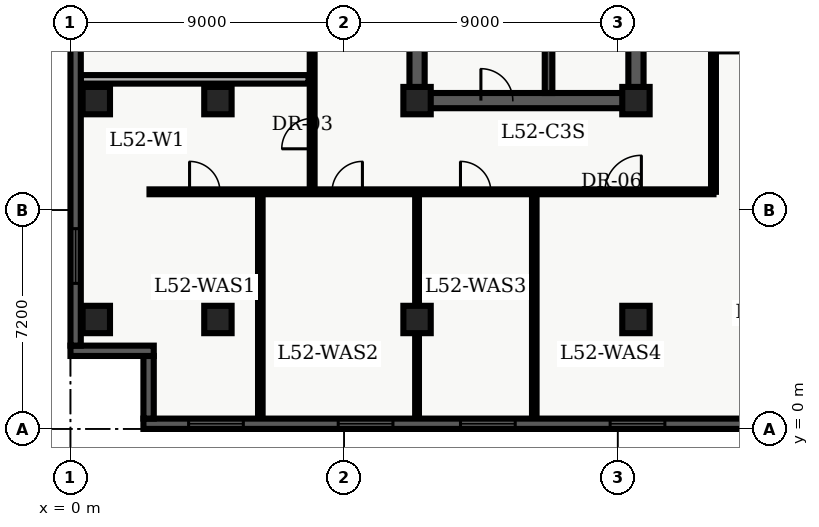
"""IFC4 building model, lengths in metres.
Left out: names, types, materials, properties, quantities, classifications, styles, units other than length and angle.
Written with IfcOpenShell. Run it as: python <this file> out.ifc"""

import sys

from ifc_helpers import new_model, entity, si_unit, converted_unit, direction, frame, origin_with_axes, origin_2d_with_axis, place, context, subcontext, project, spatial, polyline, rectangle, outline, extrude, element, fill, save


model = new_model("IFC4")
c1 = context("Model", 3, precision=1e-05, world=origin_with_axes(), true_north=direction((0.0, 1.0)))
c2 = subcontext(c1, "Body", "Model", "MODEL_VIEW")
j1 = project(units=[si_unit("LENGTHUNIT", "METRE"), converted_unit("PLANEANGLEUNIT", "DEGREE", entity("IfcPlaneAngleMeasure", 0.017), si_unit("PLANEANGLEUNIT", "RADIAN"), dimensions=[0, 0, 0, 0, 0, 0, 0])], contexts=[c1])
p1 = place(None, origin_with_axes())
s1 = spatial("IfcSite", under=j1, at=p1, CompositionType="ELEMENT")
p2 = place(p1, origin_with_axes())
s2 = spatial("IfcBuilding", under=s1, at=p2, CompositionType="ELEMENT")
p3 = place(p2, frame((0.0, 0.0, 212.1), z_axis=(0.0, 0.0, 1.0), x_axis=(1.0, 0.0, 0.0)))
s3 = spatial("IfcBuildingStorey", under=s2, at=p3, CompositionType="ELEMENT", Elevation=212.1)
p4 = place(p3, frame((11.4, 10.8, 0.0), z_axis=(0.0, 0.0, 1.0), x_axis=(0.0, 1.0, 0.0)))
e1 = element("IfcWall", 1, at=p4, inside=s3, PredefinedType="SHEAR", context=c2, shape_type="SweptSolid", body=[
    extrude(outline(polyline([(0.0, -0.25), (27.0, -0.25), (27.0, 0.25), (0.0, 0.25), (0.0, -0.25)])), origin_with_axes(), (0.0, 0.0, 1.0), 3.66),
])
p5 = place(p3, frame((11.4, 10.8, 0.0), z_axis=(0.0, 0.0, 1.0), x_axis=(1.0, 0.0, 0.0)))
e2 = element("IfcWall", 2, at=p5, inside=s3, PredefinedType="SHEAR", context=c2, shape_type="SweptSolid", body=[
    extrude(outline(polyline([(0.0, -0.25), (7.2, -0.25), (7.2, 0.25), (0.0, 0.25), (0.0, -0.25)])), origin_with_axes(), (0.0, 0.0, 1.0), 3.66),
])
p6 = place(p5, frame((2.625, 0.0, 0.0), z_axis=(0.0, 0.0, 1.0), x_axis=(1.0, 0.0, 0.0)))
e3 = element("IfcOpeningElement", 3, at=p6, cuts=e2, PredefinedType="OPENING", context=c2, shape_type="SweptSolid", body=[
    extrude(rectangle(XDim=1.05, YDim=0.52, at=origin_2d_with_axis()), origin_with_axes(), (0.0, 0.0, 1.0), 2.15),
])
p7 = place(p3, frame((18.6, 10.8, 0.0), z_axis=(0.0, 0.0, 1.0), x_axis=(0.0, 1.0, 0.0)))
e4 = element("IfcWall", 4, at=p7, inside=s3, PredefinedType="SHEAR", context=c2, shape_type="SweptSolid", body=[
    extrude(outline(polyline([(0.0, -0.25), (13.5, -0.25), (13.5, 0.25), (0.0, 0.25), (0.0, -0.25)])), origin_with_axes(), (0.0, 0.0, 1.0), 3.66),
])
p8 = place(p7, frame((11.125, 0.0, 0.0), z_axis=(0.0, 0.0, 1.0), x_axis=(1.0, 0.0, 0.0)))
e5 = element("IfcOpeningElement", 5, at=p8, cuts=e4, PredefinedType="OPENING", context=c2, shape_type="SweptSolid", body=[
    extrude(rectangle(XDim=1.05, YDim=0.52, at=origin_2d_with_axis()), origin_with_axes(), (0.0, 0.0, 1.0), 2.15),
])
p9 = place(p7, frame((2.125, 0.0, 0.0), z_axis=(0.0, 0.0, 1.0), x_axis=(1.0, 0.0, 0.0)))
e6 = element("IfcOpeningElement", 6, at=p9, cuts=e4, PredefinedType="OPENING", context=c2, shape_type="SweptSolid", body=[
    extrude(rectangle(XDim=0.95, YDim=0.52, at=origin_2d_with_axis()), origin_with_axes(), (0.0, 0.0, 1.0), 2.15),
])
p10 = place(p7, frame((6.275, 0.0, 0.0), z_axis=(0.0, 0.0, 1.0), x_axis=(1.0, 0.0, 0.0)))
e7 = element("IfcOpeningElement", 7, at=p10, cuts=e4, PredefinedType="OPENING", context=c2, shape_type="SweptSolid", body=[
    extrude(rectangle(XDim=0.95, YDim=0.52, at=origin_2d_with_axis()), origin_with_axes(), (0.0, 0.0, 1.0), 2.15),
])
p11 = place(p3, frame((15.725, 11.05, 0.0), z_axis=(0.0, 0.0, 1.0), x_axis=(0.0, 1.0, 0.0)))
e8 = element("IfcWall", 8, at=p11, inside=s3, PredefinedType="SHEAR", context=c2, shape_type="SweptSolid", body=[
    extrude(outline(polyline([(0.0, -0.125), (8.65, -0.125), (8.65, 0.125), (0.0, 0.125), (0.0, -0.125)])), origin_with_axes(), (0.0, 0.0, 1.0), 3.66),
])
for number, where, z_axis, x_axis in (
    (9, (11.4, 3.6, 0.0), (0.0, 0.0, 1.0), (1.0, 0.0, 0.0)),
    (10, (11.4, 10.8, 0.0), (0.0, 0.0, 1.0), (1.0, 0.0, 0.0)),
    (11, (18.6, 3.6, 0.0), (0.0, 0.0, 1.0), (1.0, 0.0, 0.0)),
    (12, (18.6, 10.8, 0.0), (0.0, 0.0, 1.0), (1.0, 0.0, 0.0)),
    (13, (4.85, 3.6, 0.0), (0.0, 0.0, 1.0), (1.0, 0.0, 0.0)),
    (14, (4.85, 10.8, 0.0), (0.0, 0.0, 1.0), (1.0, 0.0, 0.0)),
    (15, (0.85, 3.6, 0.0), (0.0, 0.0, 1.0), (1.0, 0.0, 0.0)),
    (16, (0.85, 10.8, 0.0), (0.0, 0.0, 1.0), (1.0, 0.0, 0.0)),
):
    element("IfcColumn", number, at=place(p3, frame(where, z_axis=z_axis, x_axis=x_axis)), inside=s3, PredefinedType="COLUMN", context=c2, shape_type="SweptSolid", body=[
        extrude(rectangle(XDim=0.9, YDim=0.9, at=origin_2d_with_axis()), origin_with_axes(), (0.0, 0.0, 1.0), 3.9),
    ])
p12 = place(p3, frame((2.6, 7.8, 0.0), z_axis=(0.0, 0.0, 1.0), x_axis=(1.0, 0.0, 0.0)))
e17 = element("IfcWall", 17, at=p12, inside=s3, PredefinedType="PARTITIONING", context=c2, shape_type="SweptSolid", body=[
    extrude(outline(polyline([(0.0, -0.08), (18.55, -0.08), (18.55, 0.08), (0.0, 0.08), (0.0, -0.08)])), origin_with_axes(), (0.0, 0.0, 1.0), 2.7),
])
p13 = place(p12, frame((1.817, 0.0, 0.0), z_axis=(0.0, 0.0, 1.0), x_axis=(1.0, 0.0, 0.0)))
e18 = element("IfcOpeningElement", 18, at=p13, cuts=e17, PredefinedType="OPENING", context=c2, shape_type="SweptSolid", body=[
    extrude(rectangle(XDim=1.0, YDim=0.18, at=origin_2d_with_axis()), origin_with_axes(), (0.0, 0.0, 1.0), 2.15),
])
p14 = place(p12, frame((6.503, 0.0, 0.0), z_axis=(0.0, 0.0, 1.0), x_axis=(1.0, 0.0, 0.0)))
e19 = element("IfcOpeningElement", 19, at=p14, cuts=e17, PredefinedType="OPENING", context=c2, shape_type="SweptSolid", body=[
    extrude(rectangle(XDim=1.0, YDim=0.18, at=origin_2d_with_axis()), origin_with_axes(), (0.0, 0.0, 1.0), 2.15),
])
p15 = place(p12, frame((10.728, 0.0, 0.0), z_axis=(0.0, 0.0, 1.0), x_axis=(1.0, 0.0, 0.0)))
e20 = element("IfcOpeningElement", 20, at=p15, cuts=e17, PredefinedType="OPENING", context=c2, shape_type="SweptSolid", body=[
    extrude(rectangle(XDim=1.0, YDim=0.18, at=origin_2d_with_axis()), origin_with_axes(), (0.0, 0.0, 1.0), 2.15),
])
p16 = place(p12, frame((15.578, 0.0, 0.0), z_axis=(0.0, 0.0, 1.0), x_axis=(1.0, 0.0, 0.0)))
e21 = element("IfcOpeningElement", 21, at=p16, cuts=e17, PredefinedType="OPENING", context=c2, shape_type="SweptSolid", body=[
    extrude(rectangle(XDim=1.2, YDim=0.18, at=origin_2d_with_axis()), origin_with_axes(), (0.0, 0.0, 1.0), 2.2),
])
p17 = place(p3, frame((21.15, 7.8, 0.0), z_axis=(0.0, 0.0, 1.0), x_axis=(0.0, 1.0, 0.0)))
e22 = element("IfcWall", 22, at=p17, inside=s3, PredefinedType="PARTITIONING", context=c2, shape_type="SweptSolid", body=[
    extrude(outline(polyline([(0.0, -0.08), (32.7, -0.08), (32.7, 0.08), (0.0, 0.08), (0.0, -0.08)])), origin_with_axes(), (0.0, 0.0, 1.0), 2.7),
])
p18 = place(p17, frame((18.399, 0.0, 0.0), z_axis=(0.0, 0.0, 1.0), x_axis=(1.0, 0.0, 0.0)))
e23 = element("IfcOpeningElement", 23, at=p18, cuts=e22, PredefinedType="OPENING", context=c2, shape_type="SweptSolid", body=[
    extrude(rectangle(XDim=1.0, YDim=0.18, at=origin_2d_with_axis()), origin_with_axes(), (0.0, 0.0, 1.0), 2.15),
])
p19 = place(p17, frame((25.06, 0.0, 0.0), z_axis=(0.0, 0.0, 1.0), x_axis=(1.0, 0.0, 0.0)))
e24 = element("IfcOpeningElement", 24, at=p19, cuts=e22, PredefinedType="OPENING", context=c2, shape_type="SweptSolid", body=[
    extrude(rectangle(XDim=1.0, YDim=0.18, at=origin_2d_with_axis()), origin_with_axes(), (0.0, 0.0, 1.0), 2.15),
])
p20 = place(p17, frame((29.911, 0.0, 0.0), z_axis=(0.0, 0.0, 1.0), x_axis=(1.0, 0.0, 0.0)))
e25 = element("IfcOpeningElement", 25, at=p20, cuts=e22, PredefinedType="OPENING", context=c2, shape_type="SweptSolid", body=[
    extrude(rectangle(XDim=1.0, YDim=0.18, at=origin_2d_with_axis()), origin_with_axes(), (0.0, 0.0, 1.0), 2.15),
])
p21 = place(p17, frame((5.775, 0.0, 0.0), z_axis=(0.0, 0.0, 1.0), x_axis=(1.0, 0.0, 0.0)))
e26 = element("IfcOpeningElement", 26, at=p21, cuts=e22, PredefinedType="OPENING", context=c2, shape_type="SweptSolid", body=[
    extrude(rectangle(XDim=1.05, YDim=0.18, at=origin_2d_with_axis()), origin_with_axes(), (0.0, 0.0, 1.0), 2.15),
])
p22 = place(p3, frame((7.95, 7.8, 0.0), z_axis=(0.0, 0.0, 1.0), x_axis=(0.0, 1.0, 0.0)))
e27 = element("IfcWall", 27, at=p22, inside=s3, PredefinedType="PARTITIONING", context=c2, shape_type="SweptSolid", body=[
    extrude(outline(polyline([(0.0, -0.08), (32.7, -0.08), (32.7, 0.08), (0.0, 0.08), (0.0, -0.08)])), origin_with_axes(), (0.0, 0.0, 1.0), 2.7),
])
p23 = place(p22, frame((1.915, 0.0, 0.0), z_axis=(0.0, 0.0, 1.0), x_axis=(1.0, 0.0, 0.0)))
e28 = element("IfcOpeningElement", 28, at=p23, cuts=e27, PredefinedType="OPENING", context=c2, shape_type="SweptSolid", body=[
    extrude(rectangle(XDim=1.0, YDim=0.18, at=origin_2d_with_axis()), origin_with_axes(), (0.0, 0.0, 1.0), 2.15),
])
p24 = place(p22, frame((5.705, 0.0, 0.0), z_axis=(0.0, 0.0, 1.0), x_axis=(1.0, 0.0, 0.0)))
e29 = element("IfcOpeningElement", 29, at=p24, cuts=e27, PredefinedType="OPENING", context=c2, shape_type="SweptSolid", body=[
    extrude(rectangle(XDim=1.0, YDim=0.18, at=origin_2d_with_axis()), origin_with_axes(), (0.0, 0.0, 1.0), 2.15),
])
p25 = place(p22, frame((10.066, 0.0, 0.0), z_axis=(0.0, 0.0, 1.0), x_axis=(1.0, 0.0, 0.0)))
e30 = element("IfcOpeningElement", 30, at=p25, cuts=e27, PredefinedType="OPENING", context=c2, shape_type="SweptSolid", body=[
    extrude(rectangle(XDim=1.0, YDim=0.18, at=origin_2d_with_axis()), origin_with_axes(), (0.0, 0.0, 1.0), 2.15),
])
p26 = place(p22, frame((15.195, 0.0, 0.0), z_axis=(0.0, 0.0, 1.0), x_axis=(1.0, 0.0, 0.0)))
e31 = element("IfcOpeningElement", 31, at=p26, cuts=e27, PredefinedType="OPENING", context=c2, shape_type="SweptSolid", body=[
    extrude(rectangle(XDim=1.0, YDim=0.18, at=origin_2d_with_axis()), origin_with_axes(), (0.0, 0.0, 1.0), 2.15),
])
p27 = place(p22, frame((21.311, 0.0, 0.0), z_axis=(0.0, 0.0, 1.0), x_axis=(1.0, 0.0, 0.0)))
e32 = element("IfcOpeningElement", 32, at=p27, cuts=e27, PredefinedType="OPENING", context=c2, shape_type="SweptSolid", body=[
    extrude(rectangle(XDim=1.0, YDim=0.18, at=origin_2d_with_axis()), origin_with_axes(), (0.0, 0.0, 1.0), 2.15),
])
p28 = place(p22, frame((28.611, 0.0, 0.0), z_axis=(0.0, 0.0, 1.0), x_axis=(1.0, 0.0, 0.0)))
e33 = element("IfcOpeningElement", 33, at=p28, cuts=e27, PredefinedType="OPENING", context=c2, shape_type="SweptSolid", body=[
    extrude(rectangle(XDim=1.0, YDim=0.18, at=origin_2d_with_axis()), origin_with_axes(), (0.0, 0.0, 1.0), 2.15),
])
p29 = place(p3, frame((0.335, 11.499, 0.0), z_axis=(0.0, 0.0, 1.0), x_axis=(1.0, 0.0, 0.0)))
e34 = element("IfcWall", 34, at=p29, inside=s3, PredefinedType="PARTITIONING", context=c2, shape_type="SweptSolid", body=[
    extrude(outline(polyline([(0.0, -0.14), (7.495, -0.14), (7.495, 0.14), (0.0, 0.14), (0.0, -0.14)])), origin_with_axes(), (0.0, 0.0, 1.0), 2.7),
])
p30 = place(p3, frame((6.245, 0.335, 0.0), z_axis=(0.0, 0.0, 1.0), x_axis=(0.0, 1.0, 0.0)))
e35 = element("IfcWall", 35, at=p30, inside=s3, PredefinedType="PARTITIONING", context=c2, shape_type="SweptSolid", body=[
    extrude(outline(polyline([(0.0, -0.075), (7.365, -0.075), (7.365, 0.075), (0.0, 0.075), (0.0, -0.075)])), origin_with_axes(), (0.0, 0.0, 1.0), 2.7),
])
p31 = place(p3, frame((11.4, 0.335, 0.0), z_axis=(0.0, 0.0, 1.0), x_axis=(0.0, 1.0, 0.0)))
e36 = element("IfcWall", 36, at=p31, inside=s3, PredefinedType="PARTITIONING", context=c2, shape_type="SweptSolid", body=[
    extrude(outline(polyline([(0.0, -0.062), (7.365, -0.062), (7.365, 0.062), (0.0, 0.062), (0.0, -0.062)])), origin_with_axes(), (0.0, 0.0, 1.0), 2.7),
])
p32 = place(p3, frame((15.256, 0.335, 0.0), z_axis=(0.0, 0.0, 1.0), x_axis=(0.0, 1.0, 0.0)))
e37 = element("IfcWall", 37, at=p32, inside=s3, PredefinedType="PARTITIONING", context=c2, shape_type="SweptSolid", body=[
    extrude(outline(polyline([(0.0, -0.075), (7.365, -0.075), (7.365, 0.075), (0.0, 0.075), (0.0, -0.075)])), origin_with_axes(), (0.0, 0.0, 1.0), 2.7),
])
p33 = place(p3, frame((57.26, 0.17, 0.0), z_axis=(0.0, 0.0, 1.0), x_axis=(-1.0, 0.0, 0.0)))
e38 = element("IfcWall", 38, at=p33, inside=s3, PredefinedType="SOLIDWALL", context=c2, shape_type="SweptSolid", body=[
    extrude(outline(polyline([(0.0, -0.17), (54.86, -0.17), (54.86, 0.17), (0.0, 0.17), (0.0, -0.17)])), origin_with_axes(), (0.0, 0.0, 1.0), 3.66),
])
p34 = place(p33, frame((2.836, 0.0, 0.45), z_axis=(0.0, 0.0, 1.0), x_axis=(1.0, 0.0, 0.0)))
e39 = element("IfcOpeningElement", 39, at=p34, cuts=e38, PredefinedType="OPENING", context=c2, shape_type="SweptSolid", body=[
    extrude(rectangle(XDim=1.8, YDim=0.36, at=origin_2d_with_axis()), origin_with_axes(), (0.0, 0.0, 1.0), 2.1),
])
p35 = place(p33, frame((7.307, 0.0, 0.45), z_axis=(0.0, 0.0, 1.0), x_axis=(1.0, 0.0, 0.0)))
e40 = element("IfcOpeningElement", 40, at=p35, cuts=e38, PredefinedType="OPENING", context=c2, shape_type="SweptSolid", body=[
    extrude(rectangle(XDim=1.8, YDim=0.36, at=origin_2d_with_axis()), origin_with_axes(), (0.0, 0.0, 1.0), 2.1),
])
p36 = place(p33, frame((11.779, 0.0, 0.45), z_axis=(0.0, 0.0, 1.0), x_axis=(1.0, 0.0, 0.0)))
e41 = element("IfcOpeningElement", 41, at=p36, cuts=e38, PredefinedType="OPENING", context=c2, shape_type="SweptSolid", body=[
    extrude(rectangle(XDim=1.8, YDim=0.36, at=origin_2d_with_axis()), origin_with_axes(), (0.0, 0.0, 1.0), 2.1),
])
p37 = place(p33, frame((16.251, 0.0, 0.45), z_axis=(0.0, 0.0, 1.0), x_axis=(1.0, 0.0, 0.0)))
e42 = element("IfcOpeningElement", 42, at=p37, cuts=e38, PredefinedType="OPENING", context=c2, shape_type="SweptSolid", body=[
    extrude(rectangle(XDim=1.8, YDim=0.36, at=origin_2d_with_axis()), origin_with_axes(), (0.0, 0.0, 1.0), 2.1),
])
p38 = place(p33, frame((20.723, 0.0, 0.45), z_axis=(0.0, 0.0, 1.0), x_axis=(1.0, 0.0, 0.0)))
e43 = element("IfcOpeningElement", 43, at=p38, cuts=e38, PredefinedType="OPENING", context=c2, shape_type="SweptSolid", body=[
    extrude(rectangle(XDim=1.8, YDim=0.36, at=origin_2d_with_axis()), origin_with_axes(), (0.0, 0.0, 1.0), 2.1),
])
p39 = place(p33, frame((25.194, 0.0, 0.45), z_axis=(0.0, 0.0, 1.0), x_axis=(1.0, 0.0, 0.0)))
e44 = element("IfcOpeningElement", 44, at=p39, cuts=e38, PredefinedType="OPENING", context=c2, shape_type="SweptSolid", body=[
    extrude(rectangle(XDim=1.8, YDim=0.36, at=origin_2d_with_axis()), origin_with_axes(), (0.0, 0.0, 1.0), 2.1),
])
p40 = place(p33, frame((29.666, 0.0, 0.45), z_axis=(0.0, 0.0, 1.0), x_axis=(1.0, 0.0, 0.0)))
e45 = element("IfcOpeningElement", 45, at=p40, cuts=e38, PredefinedType="OPENING", context=c2, shape_type="SweptSolid", body=[
    extrude(rectangle(XDim=1.8, YDim=0.36, at=origin_2d_with_axis()), origin_with_axes(), (0.0, 0.0, 1.0), 2.1),
])
p41 = place(p33, frame((34.138, 0.0, 0.45), z_axis=(0.0, 0.0, 1.0), x_axis=(1.0, 0.0, 0.0)))
e46 = element("IfcOpeningElement", 46, at=p41, cuts=e38, PredefinedType="OPENING", context=c2, shape_type="SweptSolid", body=[
    extrude(rectangle(XDim=1.8, YDim=0.36, at=origin_2d_with_axis()), origin_with_axes(), (0.0, 0.0, 1.0), 2.1),
])
p42 = place(p33, frame((38.609, 0.0, 0.45), z_axis=(0.0, 0.0, 1.0), x_axis=(1.0, 0.0, 0.0)))
e47 = element("IfcOpeningElement", 47, at=p42, cuts=e38, PredefinedType="OPENING", context=c2, shape_type="SweptSolid", body=[
    extrude(rectangle(XDim=1.8, YDim=0.36, at=origin_2d_with_axis()), origin_with_axes(), (0.0, 0.0, 1.0), 2.1),
])
p43 = place(p33, frame((43.531, 0.0, 0.45), z_axis=(0.0, 0.0, 1.0), x_axis=(1.0, 0.0, 0.0)))
e48 = element("IfcOpeningElement", 48, at=p43, cuts=e38, PredefinedType="OPENING", context=c2, shape_type="SweptSolid", body=[
    extrude(rectangle(XDim=1.8, YDim=0.36, at=origin_2d_with_axis()), origin_with_axes(), (0.0, 0.0, 1.0), 2.1),
])
p44 = place(p33, frame((47.553, 0.0, 0.45), z_axis=(0.0, 0.0, 1.0), x_axis=(1.0, 0.0, 0.0)))
e49 = element("IfcOpeningElement", 49, at=p44, cuts=e38, PredefinedType="OPENING", context=c2, shape_type="SweptSolid", body=[
    extrude(rectangle(XDim=1.8, YDim=0.36, at=origin_2d_with_axis()), origin_with_axes(), (0.0, 0.0, 1.0), 2.1),
])
p45 = place(p33, frame((52.474, 0.0, 0.45), z_axis=(0.0, 0.0, 1.0), x_axis=(1.0, 0.0, 0.0)))
e50 = element("IfcOpeningElement", 50, at=p45, cuts=e38, PredefinedType="OPENING", context=c2, shape_type="SweptSolid", body=[
    extrude(rectangle(XDim=1.8, YDim=0.36, at=origin_2d_with_axis()), origin_with_axes(), (0.0, 0.0, 1.0), 2.1),
])
p46 = place(p3, frame((2.57, 0.34, 0.0), z_axis=(0.0, 0.0, 1.0), x_axis=(0.0, 1.0, 0.0)))
e51 = element("IfcWall", 51, at=p46, inside=s3, PredefinedType="SOLIDWALL", context=c2, shape_type="SweptSolid", body=[
    extrude(outline(polyline([(0.0, -0.17), (2.06, -0.17), (2.06, 0.17), (0.0, 0.17), (0.0, -0.17)])), origin_with_axes(), (0.0, 0.0, 1.0), 3.66),
])
p47 = place(p3, frame((2.74, 2.57, 0.0), z_axis=(0.0, 0.0, 1.0), x_axis=(-1.0, 0.0, 0.0)))
e52 = element("IfcWall", 52, at=p47, inside=s3, PredefinedType="SOLIDWALL", context=c2, shape_type="SweptSolid", body=[
    extrude(outline(polyline([(0.0, -0.17), (2.74, -0.17), (2.74, 0.17), (0.0, 0.17), (0.0, -0.17)])), origin_with_axes(), (0.0, 0.0, 1.0), 3.66),
])
p48 = place(p3, frame((0.17, 2.74, 0.0), z_axis=(0.0, 0.0, 1.0), x_axis=(0.0, 1.0, 0.0)))
e53 = element("IfcWall", 53, at=p48, inside=s3, PredefinedType="SOLIDWALL", context=c2, shape_type="SweptSolid", body=[
    extrude(outline(polyline([(0.0, -0.17), (43.46, -0.17), (43.46, 0.17), (0.0, 0.17), (0.0, -0.17)])), origin_with_axes(), (0.0, 0.0, 1.0), 3.66),
])
p49 = place(p48, frame((2.948, 0.0, 0.45), z_axis=(0.0, 0.0, 1.0), x_axis=(1.0, 0.0, 0.0)))
e54 = element("IfcOpeningElement", 54, at=p49, cuts=e53, PredefinedType="OPENING", context=c2, shape_type="SweptSolid", body=[
    extrude(rectangle(XDim=1.8, YDim=0.36, at=origin_2d_with_axis()), origin_with_axes(), (0.0, 0.0, 1.0), 2.1),
])
p50 = place(p48, frame((21.28, 0.0, 0.45), z_axis=(0.0, 0.0, 1.0), x_axis=(1.0, 0.0, 0.0)))
e55 = element("IfcOpeningElement", 55, at=p50, cuts=e53, PredefinedType="OPENING", context=c2, shape_type="SweptSolid", body=[
    extrude(rectangle(XDim=1.8, YDim=0.36, at=origin_2d_with_axis()), origin_with_axes(), (0.0, 0.0, 1.0), 2.1),
])
p51 = place(p48, frame((26.426, 0.0, 0.45), z_axis=(0.0, 0.0, 1.0), x_axis=(1.0, 0.0, 0.0)))
e56 = element("IfcOpeningElement", 56, at=p51, cuts=e53, PredefinedType="OPENING", context=c2, shape_type="SweptSolid", body=[
    extrude(rectangle(XDim=1.8, YDim=0.36, at=origin_2d_with_axis()), origin_with_axes(), (0.0, 0.0, 1.0), 2.1),
])
p52 = place(p48, frame((31.121, 0.0, 0.45), z_axis=(0.0, 0.0, 1.0), x_axis=(1.0, 0.0, 0.0)))
e57 = element("IfcOpeningElement", 57, at=p52, cuts=e53, PredefinedType="OPENING", context=c2, shape_type="SweptSolid", body=[
    extrude(rectangle(XDim=1.8, YDim=0.36, at=origin_2d_with_axis()), origin_with_axes(), (0.0, 0.0, 1.0), 2.1),
])
p53 = place(p48, frame((40.062, 0.0, 0.45), z_axis=(0.0, 0.0, 1.0), x_axis=(1.0, 0.0, 0.0)))
e58 = element("IfcOpeningElement", 58, at=p53, cuts=e53, PredefinedType="OPENING", context=c2, shape_type="SweptSolid", body=[
    extrude(rectangle(XDim=1.8, YDim=0.36, at=origin_2d_with_axis()), origin_with_axes(), (0.0, 0.0, 1.0), 2.1),
])
p54 = place(p5, frame((2.625, 0.0, 0.0), z_axis=(0.0, 0.0, 1.0), x_axis=(1.0, 0.0, 0.0)))
e59 = element("IfcDoor", 59, at=p54, inside=s3, OperationType="SINGLE_SWING_LEFT", PredefinedType="DOOR", context=c2, shape_type="SweptSolid", body=[
    extrude(rectangle(XDim=1.05, YDim=0.09, at=origin_2d_with_axis()), origin_with_axes(), (0.0, 0.0, 1.0), 2.15),
])
fill(e3, e59)
p55 = place(p22, frame((1.915, 0.0, 0.0), z_axis=(0.0, 0.0, 1.0), x_axis=(1.0, 0.0, 0.0)))
e60 = element("IfcDoor", 60, at=p55, inside=s3, OperationType="SINGLE_SWING_LEFT", PredefinedType="DOOR", context=c2, shape_type="SweptSolid", body=[
    extrude(rectangle(XDim=1.0, YDim=0.09, at=origin_2d_with_axis()), origin_with_axes(), (0.0, 0.0, 1.0), 2.15),
])
fill(e28, e60)
p56 = place(p12, frame((1.817, 0.0, 0.0), z_axis=(0.0, 0.0, 1.0), x_axis=(1.0, 0.0, 0.0)))
e61 = element("IfcDoor", 61, at=p56, inside=s3, OperationType="SINGLE_SWING_LEFT", PredefinedType="DOOR", context=c2, shape_type="SweptSolid", body=[
    extrude(rectangle(XDim=1.0, YDim=0.09, at=origin_2d_with_axis()), origin_with_axes(), (0.0, 0.0, 1.0), 2.15),
])
fill(e18, e61)
p57 = place(p12, frame((6.503, 0.0, 0.0), z_axis=(0.0, 0.0, 1.0), x_axis=(1.0, 0.0, 0.0)))
e62 = element("IfcDoor", 62, at=p57, inside=s3, OperationType="SINGLE_SWING_RIGHT", PredefinedType="DOOR", context=c2, shape_type="SweptSolid", body=[
    extrude(rectangle(XDim=1.0, YDim=0.09, at=origin_2d_with_axis()), origin_with_axes(), (0.0, 0.0, 1.0), 2.15),
])
fill(e19, e62)
p58 = place(p12, frame((10.728, 0.0, 0.0), z_axis=(0.0, 0.0, 1.0), x_axis=(1.0, 0.0, 0.0)))
e63 = element("IfcDoor", 63, at=p58, inside=s3, OperationType="SINGLE_SWING_LEFT", PredefinedType="DOOR", context=c2, shape_type="SweptSolid", body=[
    extrude(rectangle(XDim=1.0, YDim=0.09, at=origin_2d_with_axis()), origin_with_axes(), (0.0, 0.0, 1.0), 2.15),
])
fill(e20, e63)
p59 = place(p12, frame((15.578, 0.0, 0.0), z_axis=(0.0, 0.0, 1.0), x_axis=(1.0, 0.0, 0.0)))
e64 = element("IfcDoor", 64, at=p59, inside=s3, OperationType="SINGLE_SWING_RIGHT", PredefinedType="DOOR", context=c2, shape_type="SweptSolid", body=[
    extrude(rectangle(XDim=1.2, YDim=0.09, at=origin_2d_with_axis()), origin_with_axes(), (0.0, 0.0, 1.0), 2.2),
])
fill(e21, e64)
p60 = place(p33, frame((38.609, 0.0, 0.45), z_axis=(0.0, 0.0, 1.0), x_axis=(1.0, 0.0, 0.0)))
e65 = element("IfcWindow", 65, at=p60, inside=s3, PredefinedType="WINDOW", context=c2, shape_type="SweptSolid", body=[
    extrude(rectangle(XDim=1.8, YDim=0.09, at=origin_2d_with_axis()), origin_with_axes(), (0.0, 0.0, 1.0), 2.1),
])
fill(e47, e65)
p61 = place(p33, frame((43.531, 0.0, 0.45), z_axis=(0.0, 0.0, 1.0), x_axis=(1.0, 0.0, 0.0)))
e66 = element("IfcWindow", 66, at=p61, inside=s3, PredefinedType="WINDOW", context=c2, shape_type="SweptSolid", body=[
    extrude(rectangle(XDim=1.8, YDim=0.09, at=origin_2d_with_axis()), origin_with_axes(), (0.0, 0.0, 1.0), 2.1),
])
fill(e48, e66)
p62 = place(p33, frame((47.553, 0.0, 0.45), z_axis=(0.0, 0.0, 1.0), x_axis=(1.0, 0.0, 0.0)))
e67 = element("IfcWindow", 67, at=p62, inside=s3, PredefinedType="WINDOW", context=c2, shape_type="SweptSolid", body=[
    extrude(rectangle(XDim=1.8, YDim=0.09, at=origin_2d_with_axis()), origin_with_axes(), (0.0, 0.0, 1.0), 2.1),
])
fill(e49, e67)
p63 = place(p33, frame((52.474, 0.0, 0.45), z_axis=(0.0, 0.0, 1.0), x_axis=(1.0, 0.0, 0.0)))
e68 = element("IfcWindow", 68, at=p63, inside=s3, PredefinedType="WINDOW", context=c2, shape_type="SweptSolid", body=[
    extrude(rectangle(XDim=1.8, YDim=0.09, at=origin_2d_with_axis()), origin_with_axes(), (0.0, 0.0, 1.0), 2.1),
])
fill(e50, e68)
p64 = place(p48, frame((2.948, 0.0, 0.45), z_axis=(0.0, 0.0, 1.0), x_axis=(1.0, 0.0, 0.0)))
e69 = element("IfcWindow", 69, at=p64, inside=s3, PredefinedType="WINDOW", context=c2, shape_type="SweptSolid", body=[
    extrude(rectangle(XDim=1.8, YDim=0.09, at=origin_2d_with_axis()), origin_with_axes(), (0.0, 0.0, 1.0), 2.1),
])
fill(e54, e69)
save(model, sys.argv[1])
